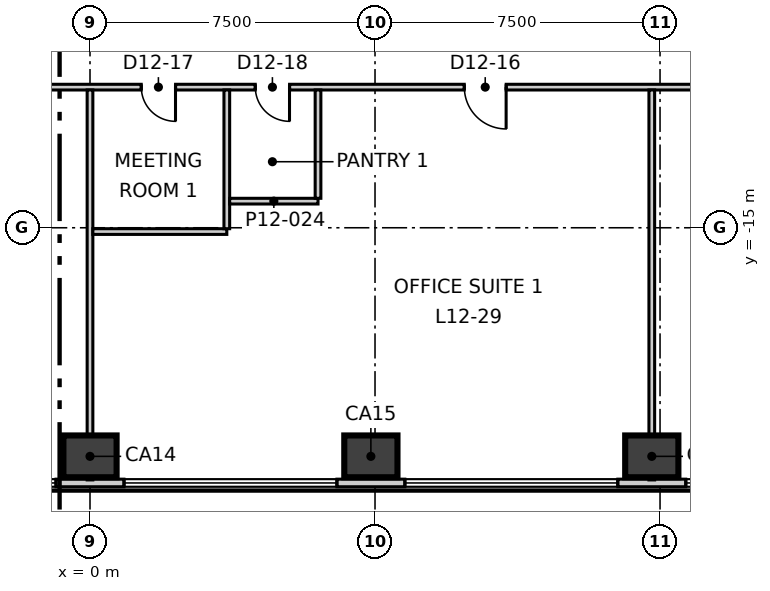
"""IFC4 building model, lengths in metres.
Left out: names, types, materials, properties, quantities, classifications, styles, units other than length and angle.
Written with IfcOpenShell. Run it as: python <this file> out.ifc"""

import sys

from ifc_helpers import new_model, si_unit, direction, frame, frame_2d, origin, origin_2d, place, context, subcontext, project, spatial, rectangle, extrude, element, fill, save


model = new_model("IFC4")
c1 = context("Model", 3, precision=1e-05, world=origin(), true_north=direction((0.0, 1.0)))
c2 = subcontext(c1, "Body", "Model", "MODEL_VIEW")
j1 = project(units=[si_unit("LENGTHUNIT", "METRE"), si_unit("PLANEANGLEUNIT", "RADIAN")], contexts=[c1])
p1 = place(None, origin())
s1 = spatial("IfcSite", under=j1, at=p1, CompositionType="ELEMENT")
p2 = place(p1, origin())
s2 = spatial("IfcBuilding", under=s1, at=p2, CompositionType="ELEMENT")
p3 = place(p2, frame((0.0, 0.0, 59.3)))
s3 = spatial("IfcBuildingStorey", under=s2, at=p3, CompositionType="ELEMENT", Elevation=59.3)
for number, where, z_axis, x_axis in (
    (1, (0.0, -21.015, -0.3), (0.0, 0.0, 1.0), (1.0, 0.0, 0.0)),
    (2, (7.391, -21.015, -0.3), (0.0, 0.0, 1.0), (1.0, 0.0, 0.0)),
    (3, (14.783, -21.015, -0.3), (0.0, 0.0, 1.0), (1.0, 0.0, 0.0)),
):
    element("IfcColumn", number, at=place(p3, frame(where, z_axis=z_axis, x_axis=x_axis)), inside=s3, PredefinedType="COLUMN", context=c2, shape_type="SweptSolid", body=[
        extrude(rectangle(XDim=1.4, YDim=1.1, at=origin_2d()), origin(), (0.0, 0.0, 1.0), 4.0),
    ])
p4 = place(p3, frame((-30.869, -21.715, 0.0), z_axis=(0.0, 0.0, 1.0), x_axis=(1.0, 0.0, 0.0)))
e4 = element("IfcWall", 4, at=p4, inside=s3, PredefinedType="ELEMENTEDWALL", context=c2, shape_type="SweptSolid", body=[
    extrude(rectangle(XDim=61.718, YDim=0.2, at=frame_2d((30.859, 0.0))), origin(), (0.0, 0.0, 1.0), 3.7),
])
p5 = place(p4, frame((2.199, 0.0, 0.9)))
e5 = element("IfcOpeningElement", 5, at=p5, cuts=e4, PredefinedType="OPENING", context=c2, shape_type="SweptSolid", body=[
    extrude(rectangle(XDim=5.6, YDim=2.5, at=frame_2d((2.8, 1.25))), frame((0.0, 0.11, 0.0), z_axis=(0.0, -1.0, 0.0), x_axis=(1.0, 0.0, 0.0)), (0.0, 0.0, 1.0), 0.22),
])
p6 = place(p4, frame((9.59, 0.0, 0.9)))
e6 = element("IfcOpeningElement", 6, at=p6, cuts=e4, PredefinedType="OPENING", context=c2, shape_type="SweptSolid", body=[
    extrude(rectangle(XDim=5.6, YDim=2.5, at=frame_2d((2.8, 1.25))), frame((0.0, 0.11, 0.0), z_axis=(0.0, -1.0, 0.0), x_axis=(1.0, 0.0, 0.0)), (0.0, 0.0, 1.0), 0.22),
])
p7 = place(p4, frame((16.982, 0.0, 0.9)))
e7 = element("IfcOpeningElement", 7, at=p7, cuts=e4, PredefinedType="OPENING", context=c2, shape_type="SweptSolid", body=[
    extrude(rectangle(XDim=5.6, YDim=2.5, at=frame_2d((2.8, 1.25))), frame((0.0, 0.11, 0.0), z_axis=(0.0, -1.0, 0.0), x_axis=(1.0, 0.0, 0.0)), (0.0, 0.0, 1.0), 0.22),
])
p8 = place(p4, frame((24.373, 0.0, 0.9)))
e8 = element("IfcOpeningElement", 8, at=p8, cuts=e4, PredefinedType="OPENING", context=c2, shape_type="SweptSolid", body=[
    extrude(rectangle(XDim=5.6, YDim=2.5, at=frame_2d((2.8, 1.25))), frame((0.0, 0.11, 0.0), z_axis=(0.0, -1.0, 0.0), x_axis=(1.0, 0.0, 0.0)), (0.0, 0.0, 1.0), 0.22),
])
p9 = place(p4, frame((31.765, 0.0, 0.9)))
e9 = element("IfcOpeningElement", 9, at=p9, cuts=e4, PredefinedType="OPENING", context=c2, shape_type="SweptSolid", body=[
    extrude(rectangle(XDim=5.6, YDim=2.5, at=frame_2d((2.8, 1.25))), frame((0.0, 0.11, 0.0), z_axis=(0.0, -1.0, 0.0), x_axis=(1.0, 0.0, 0.0)), (0.0, 0.0, 1.0), 0.22),
])
p10 = place(p4, frame((39.156, 0.0, 0.9)))
e10 = element("IfcOpeningElement", 10, at=p10, cuts=e4, PredefinedType="OPENING", context=c2, shape_type="SweptSolid", body=[
    extrude(rectangle(XDim=5.6, YDim=2.5, at=frame_2d((2.8, 1.25))), frame((0.0, 0.11, 0.0), z_axis=(0.0, -1.0, 0.0), x_axis=(1.0, 0.0, 0.0)), (0.0, 0.0, 1.0), 0.22),
])
p11 = place(p4, frame((46.548, 0.0, 0.9)))
e11 = element("IfcOpeningElement", 11, at=p11, cuts=e4, PredefinedType="OPENING", context=c2, shape_type="SweptSolid", body=[
    extrude(rectangle(XDim=5.6, YDim=2.5, at=frame_2d((2.8, 1.25))), frame((0.0, 0.11, 0.0), z_axis=(0.0, -1.0, 0.0), x_axis=(1.0, 0.0, 0.0)), (0.0, 0.0, 1.0), 0.22),
])
p12 = place(p4, frame((53.939, 0.0, 0.9)))
e12 = element("IfcOpeningElement", 12, at=p12, cuts=e4, PredefinedType="OPENING", context=c2, shape_type="SweptSolid", body=[
    extrude(rectangle(XDim=5.6, YDim=2.5, at=frame_2d((2.8, 1.25))), frame((0.0, 0.11, 0.0), z_axis=(0.0, -1.0, 0.0), x_axis=(1.0, 0.0, 0.0)), (0.0, 0.0, 1.0), 0.22),
])
p13 = place(p3, frame((34.241, -15.876, 0.0), z_axis=(0.0, 0.0, 1.0), x_axis=(-0.500006313899, 0.866021758423, 0.0)))
e13 = element("IfcWall", 13, at=p13, inside=s3, PredefinedType="ELEMENTEDWALL", context=c2, shape_type="SweptSolid", body=[
    extrude(rectangle(XDim=61.719, YDim=0.2, at=frame_2d((30.859, 0.0))), origin(), (0.0, 0.0, 1.0), 3.7),
])
p14 = place(p13, frame((2.199, 0.0, 0.9)))
e14 = element("IfcOpeningElement", 14, at=p14, cuts=e13, PredefinedType="OPENING", context=c2, shape_type="SweptSolid", body=[
    extrude(rectangle(XDim=5.6, YDim=2.5, at=frame_2d((2.8, 1.25))), frame((0.0, 0.11, 0.0), z_axis=(0.0, -1.0, 0.0), x_axis=(1.0, 0.0, 0.0)), (0.0, 0.0, 1.0), 0.22),
])
p15 = place(p13, frame((9.59, 0.0, 0.9)))
e15 = element("IfcOpeningElement", 15, at=p15, cuts=e13, PredefinedType="OPENING", context=c2, shape_type="SweptSolid", body=[
    extrude(rectangle(XDim=5.6, YDim=2.5, at=frame_2d((2.8, 1.25))), frame((0.0, 0.11, 0.0), z_axis=(0.0, -1.0, 0.0), x_axis=(1.0, 0.0, 0.0)), (0.0, 0.0, 1.0), 0.22),
])
p16 = place(p13, frame((16.982, 0.0, 0.9)))
e16 = element("IfcOpeningElement", 16, at=p16, cuts=e13, PredefinedType="OPENING", context=c2, shape_type="SweptSolid", body=[
    extrude(rectangle(XDim=5.6, YDim=2.5, at=frame_2d((2.8, 1.25))), frame((0.0, 0.11, 0.0), z_axis=(0.0, -1.0, 0.0), x_axis=(1.0, 0.0, 0.0)), (0.0, 0.0, 1.0), 0.22),
])
p17 = place(p13, frame((24.374, 0.0, 0.9)))
e17 = element("IfcOpeningElement", 17, at=p17, cuts=e13, PredefinedType="OPENING", context=c2, shape_type="SweptSolid", body=[
    extrude(rectangle(XDim=5.6, YDim=2.5, at=frame_2d((2.8, 1.25))), frame((0.0, 0.11, 0.0), z_axis=(0.0, -1.0, 0.0), x_axis=(1.0, 0.0, 0.0)), (0.0, 0.0, 1.0), 0.22),
])
p18 = place(p13, frame((31.765, 0.0, 0.9)))
e18 = element("IfcOpeningElement", 18, at=p18, cuts=e13, PredefinedType="OPENING", context=c2, shape_type="SweptSolid", body=[
    extrude(rectangle(XDim=5.6, YDim=2.5, at=frame_2d((2.8, 1.25))), frame((0.0, 0.11, 0.0), z_axis=(0.0, -1.0, 0.0), x_axis=(1.0, 0.0, 0.0)), (0.0, 0.0, 1.0), 0.22),
])
p19 = place(p13, frame((39.157, 0.0, 0.9)))
e19 = element("IfcOpeningElement", 19, at=p19, cuts=e13, PredefinedType="OPENING", context=c2, shape_type="SweptSolid", body=[
    extrude(rectangle(XDim=5.6, YDim=2.5, at=frame_2d((2.8, 1.25))), frame((0.0, 0.11, 0.0), z_axis=(0.0, -1.0, 0.0), x_axis=(1.0, 0.0, 0.0)), (0.0, 0.0, 1.0), 0.22),
])
p20 = place(p13, frame((46.549, 0.0, 0.9)))
e20 = element("IfcOpeningElement", 20, at=p20, cuts=e13, PredefinedType="OPENING", context=c2, shape_type="SweptSolid", body=[
    extrude(rectangle(XDim=5.6, YDim=2.5, at=frame_2d((2.8, 1.25))), frame((0.0, 0.11, 0.0), z_axis=(0.0, -1.0, 0.0), x_axis=(1.0, 0.0, 0.0)), (0.0, 0.0, 1.0), 0.22),
])
p21 = place(p13, frame((53.94, 0.0, 0.9)))
e21 = element("IfcOpeningElement", 21, at=p21, cuts=e13, PredefinedType="OPENING", context=c2, shape_type="SweptSolid", body=[
    extrude(rectangle(XDim=5.6, YDim=2.5, at=frame_2d((2.8, 1.25))), frame((0.0, 0.11, 0.0), z_axis=(0.0, -1.0, 0.0), x_axis=(1.0, 0.0, 0.0)), (0.0, 0.0, 1.0), 0.22),
])
p22 = place(p3, frame((-19.497, -11.17, 0.0), z_axis=(0.0, 0.0, 1.0), x_axis=(0.499998854553, 0.866026065108, 0.0)))
e22 = element("IfcWall", 22, at=p22, inside=s3, PredefinedType="PARTITIONING", context=c2, shape_type="SweptSolid", body=[
    extrude(rectangle(XDim=38.994, YDim=0.15, at=frame_2d((19.497, 0.0))), origin(), (0.0, 0.0, 1.0), 3.7),
])
p23 = place(p22, frame((36.044, 0.0, 0.0)))
e23 = element("IfcOpeningElement", 23, at=p23, cuts=e22, PredefinedType="OPENING", context=c2, shape_type="SweptSolid", body=[
    extrude(rectangle(XDim=1.1, YDim=2.1, at=frame_2d((0.55, 1.05))), frame((0.0, 0.085, 0.0), z_axis=(0.0, -1.0, 0.0), x_axis=(1.0, 0.0, 0.0)), (0.0, 0.0, 1.0), 0.17),
])
p24 = place(p22, frame((21.855, 0.0, 0.0)))
e24 = element("IfcOpeningElement", 24, at=p24, cuts=e22, PredefinedType="OPENING", context=c2, shape_type="SweptSolid", body=[
    extrude(rectangle(XDim=1.1, YDim=2.1, at=frame_2d((0.55, 1.05))), frame((0.0, 0.085, 0.0), z_axis=(0.0, -1.0, 0.0), x_axis=(1.0, 0.0, 0.0)), (0.0, 0.0, 1.0), 0.17),
])
p25 = place(p22, frame((32.155, 0.0, 0.0)))
e25 = element("IfcOpeningElement", 25, at=p25, cuts=e22, PredefinedType="OPENING", context=c2, shape_type="SweptSolid", body=[
    extrude(rectangle(XDim=0.9, YDim=2.1, at=frame_2d((0.45, 1.05))), frame((0.0, 0.085, 0.0), z_axis=(0.0, -1.0, 0.0), x_axis=(1.0, 0.0, 0.0)), (0.0, 0.0, 1.0), 0.17),
])
p26 = place(p22, frame((28.955, 0.0, 0.0)))
e26 = element("IfcOpeningElement", 26, at=p26, cuts=e22, PredefinedType="OPENING", context=c2, shape_type="SweptSolid", body=[
    extrude(rectangle(XDim=0.9, YDim=2.1, at=frame_2d((0.45, 1.05))), frame((0.0, 0.085, 0.0), z_axis=(0.0, -1.0, 0.0), x_axis=(1.0, 0.0, 0.0)), (0.0, 0.0, 1.0), 0.17),
])
p27 = place(p22, frame((26.055, 0.0, 0.0)))
e27 = element("IfcOpeningElement", 27, at=p27, cuts=e22, PredefinedType="OPENING", context=c2, shape_type="SweptSolid", body=[
    extrude(rectangle(XDim=1.0, YDim=2.1, at=frame_2d((0.5, 1.05))), frame((0.0, 0.085, 0.0), z_axis=(0.0, -1.0, 0.0), x_axis=(1.0, 0.0, 0.0)), (0.0, 0.0, 1.0), 0.17),
])
p28 = place(p22, frame((10.373, 0.0, 0.0)))
e28 = element("IfcOpeningElement", 28, at=p28, cuts=e22, PredefinedType="OPENING", context=c2, shape_type="SweptSolid", body=[
    extrude(rectangle(XDim=1.0, YDim=2.1, at=frame_2d((0.5, 1.05))), frame((0.0, 0.085, 0.0), z_axis=(0.0, -1.0, 0.0), x_axis=(1.0, 0.0, 0.0)), (0.0, 0.0, 1.0), 0.17),
])
p29 = place(p22, frame((17.773, 0.0, 0.0)))
e29 = element("IfcOpeningElement", 29, at=p29, cuts=e22, PredefinedType="OPENING", context=c2, shape_type="SweptSolid", body=[
    extrude(rectangle(XDim=0.9, YDim=2.1, at=frame_2d((0.45, 1.05))), frame((0.0, 0.085, 0.0), z_axis=(0.0, -1.0, 0.0), x_axis=(1.0, 0.0, 0.0)), (0.0, 0.0, 1.0), 0.17),
])
p30 = place(p22, frame((1.689, 0.0, 0.0)))
e30 = element("IfcOpeningElement", 30, at=p30, cuts=e22, PredefinedType="OPENING", context=c2, shape_type="SweptSolid", body=[
    extrude(rectangle(XDim=1.1, YDim=2.1, at=frame_2d((0.55, 1.05))), frame((0.0, 0.085, 0.0), z_axis=(0.0, -1.0, 0.0), x_axis=(1.0, 0.0, 0.0)), (0.0, 0.0, 1.0), 0.17),
])
p31 = place(p3, frame((-19.422, -11.3, 0.0), z_axis=(0.0, 0.0, 1.0), x_axis=(1.0, 0.0, 0.0)))
e31 = element("IfcWall", 31, at=p31, inside=s3, PredefinedType="PARTITIONING", context=c2, shape_type="SweptSolid", body=[
    extrude(rectangle(XDim=38.994, YDim=0.15, at=frame_2d((19.497, 0.0))), origin(), (0.0, 0.0, 1.0), 3.7),
])
p32 = place(p31, frame((1.7, 0.0, 0.0)))
e32 = element("IfcOpeningElement", 32, at=p32, cuts=e31, PredefinedType="OPENING", context=c2, shape_type="SweptSolid", body=[
    extrude(rectangle(XDim=1.1, YDim=2.1, at=frame_2d((0.55, 1.05))), frame((0.0, 0.085, 0.0), z_axis=(0.0, -1.0, 0.0), x_axis=(1.0, 0.0, 0.0)), (0.0, 0.0, 1.0), 0.17),
])
p33 = place(p31, frame((12.889, 0.0, 0.0)))
e33 = element("IfcOpeningElement", 33, at=p33, cuts=e31, PredefinedType="OPENING", context=c2, shape_type="SweptSolid", body=[
    extrude(rectangle(XDim=1.0, YDim=2.1, at=frame_2d((0.5, 1.05))), frame((0.0, 0.085, 0.0), z_axis=(0.0, -1.0, 0.0), x_axis=(1.0, 0.0, 0.0)), (0.0, 0.0, 1.0), 0.17),
])
p34 = place(p31, frame((5.589, 0.0, 0.0)))
e34 = element("IfcOpeningElement", 34, at=p34, cuts=e31, PredefinedType="OPENING", context=c2, shape_type="SweptSolid", body=[
    extrude(rectangle(XDim=0.9, YDim=2.1, at=frame_2d((0.45, 1.05))), frame((0.0, 0.085, 0.0), z_axis=(0.0, -1.0, 0.0), x_axis=(1.0, 0.0, 0.0)), (0.0, 0.0, 1.0), 0.17),
])
p35 = place(p31, frame((29.272, 0.0, 0.0)))
e35 = element("IfcOpeningElement", 35, at=p35, cuts=e31, PredefinedType="OPENING", context=c2, shape_type="SweptSolid", body=[
    extrude(rectangle(XDim=1.1, YDim=2.1, at=frame_2d((0.55, 1.05))), frame((0.0, 0.085, 0.0), z_axis=(0.0, -1.0, 0.0), x_axis=(1.0, 0.0, 0.0)), (0.0, 0.0, 1.0), 0.17),
])
p36 = place(p31, frame((20.772, 0.0, 0.0)))
e36 = element("IfcOpeningElement", 36, at=p36, cuts=e31, PredefinedType="OPENING", context=c2, shape_type="SweptSolid", body=[
    extrude(rectangle(XDim=0.9, YDim=2.1, at=frame_2d((0.45, 1.05))), frame((0.0, 0.085, 0.0), z_axis=(0.0, -1.0, 0.0), x_axis=(1.0, 0.0, 0.0)), (0.0, 0.0, 1.0), 0.17),
])
p37 = place(p31, frame((23.772, 0.0, 0.0)))
e37 = element("IfcOpeningElement", 37, at=p37, cuts=e31, PredefinedType="OPENING", context=c2, shape_type="SweptSolid", body=[
    extrude(rectangle(XDim=0.9, YDim=2.1, at=frame_2d((0.45, 1.05))), frame((0.0, 0.085, 0.0), z_axis=(0.0, -1.0, 0.0), x_axis=(1.0, 0.0, 0.0)), (0.0, 0.0, 1.0), 0.17),
])
p38 = place(p31, frame((36.055, 0.0, 0.0)))
e38 = element("IfcOpeningElement", 38, at=p38, cuts=e31, PredefinedType="OPENING", context=c2, shape_type="SweptSolid", body=[
    extrude(rectangle(XDim=1.1, YDim=2.1, at=frame_2d((0.55, 1.05))), frame((0.0, 0.085, 0.0), z_axis=(0.0, -1.0, 0.0), x_axis=(1.0, 0.0, 0.0)), (0.0, 0.0, 1.0), 0.17),
])
p39 = place(p3, frame((0.0, -21.635, 0.0), z_axis=(0.0, 0.0, 1.0), x_axis=(0.0, 1.0, 0.0)))
e39 = element("IfcWall", 39, at=p39, inside=s3, PredefinedType="PARTITIONING", context=c2, shape_type="SweptSolid", body=[
    extrude(rectangle(XDim=10.26, YDim=0.15, at=frame_2d((5.13, 0.0))), origin(), (0.0, 0.0, 1.0), 3.2),
])
p40 = place(p3, frame((0.075, -15.1, 0.0), z_axis=(0.0, 0.0, 1.0), x_axis=(1.0, 0.0, 0.0)))
e40 = element("IfcWall", 40, at=p40, inside=s3, PredefinedType="PARTITIONING", context=c2, shape_type="SweptSolid", body=[
    extrude(rectangle(XDim=3.525, YDim=0.15, at=frame_2d((1.763, 0.0))), origin(), (0.0, 0.0, 1.0), 3.7),
])
p41 = place(p3, frame((3.6, -15.025, 0.0), z_axis=(0.0, 0.0, 1.0), x_axis=(0.0, 1.0, 0.0)))
e41 = element("IfcWall", 41, at=p41, inside=s3, PredefinedType="PARTITIONING", context=c2, shape_type="SweptSolid", body=[
    extrude(rectangle(XDim=3.65, YDim=0.15, at=frame_2d((1.825, 0.0))), origin(), (0.0, 0.0, 1.0), 3.7),
])
p42 = place(p3, frame((0.075, 22.47, 0.0), z_axis=(0.0, 0.0, 1.0), x_axis=(0.500002280369, -0.866024087209, 0.0)))
e42 = element("IfcWall", 42, at=p42, inside=s3, PredefinedType="PARTITIONING", context=c2, shape_type="SweptSolid", body=[
    extrude(rectangle(XDim=38.844, YDim=0.15, at=frame_2d((19.422, 0.0))), origin(), (0.0, 0.0, 1.0), 3.7),
])
p43 = place(p42, frame((36.044, 0.0, 0.0)))
e43 = element("IfcOpeningElement", 43, at=p43, cuts=e42, PredefinedType="OPENING", context=c2, shape_type="SweptSolid", body=[
    extrude(rectangle(XDim=1.1, YDim=2.1, at=frame_2d((0.55, 1.05))), frame((0.0, 0.085, 0.0), z_axis=(0.0, -1.0, 0.0), x_axis=(1.0, 0.0, 0.0)), (0.0, 0.0, 1.0), 0.17),
])
p44 = place(p42, frame((26.255, 0.0, 0.0)))
e44 = element("IfcOpeningElement", 44, at=p44, cuts=e42, PredefinedType="OPENING", context=c2, shape_type="SweptSolid", body=[
    extrude(rectangle(XDim=1.1, YDim=2.1, at=frame_2d((0.55, 1.05))), frame((0.0, 0.085, 0.0), z_axis=(0.0, -1.0, 0.0), x_axis=(1.0, 0.0, 0.0)), (0.0, 0.0, 1.0), 0.17),
])
p45 = place(p42, frame((9.173, 0.0, 0.0)))
e45 = element("IfcOpeningElement", 45, at=p45, cuts=e42, PredefinedType="OPENING", context=c2, shape_type="SweptSolid", body=[
    extrude(rectangle(XDim=1.1, YDim=2.1, at=frame_2d((0.55, 1.05))), frame((0.0, 0.085, 0.0), z_axis=(0.0, -1.0, 0.0), x_axis=(1.0, 0.0, 0.0)), (0.0, 0.0, 1.0), 0.17),
])
p46 = place(p42, frame((17.373, 0.0, 0.0)))
e46 = element("IfcOpeningElement", 46, at=p46, cuts=e42, PredefinedType="OPENING", context=c2, shape_type="SweptSolid", body=[
    extrude(rectangle(XDim=0.9, YDim=2.1, at=frame_2d((0.45, 1.05))), frame((0.0, 0.085, 0.0), z_axis=(0.0, -1.0, 0.0), x_axis=(1.0, 0.0, 0.0)), (0.0, 0.0, 1.0), 0.17),
])
p47 = place(p42, frame((14.173, 0.0, 0.0)))
e47 = element("IfcOpeningElement", 47, at=p47, cuts=e42, PredefinedType="OPENING", context=c2, shape_type="SweptSolid", body=[
    extrude(rectangle(XDim=0.9, YDim=2.1, at=frame_2d((0.45, 1.05))), frame((0.0, 0.085, 0.0), z_axis=(0.0, -1.0, 0.0), x_axis=(1.0, 0.0, 0.0)), (0.0, 0.0, 1.0), 0.17),
])
p48 = place(p42, frame((11.273, 0.0, 0.0)))
e48 = element("IfcOpeningElement", 48, at=p48, cuts=e42, PredefinedType="OPENING", context=c2, shape_type="SweptSolid", body=[
    extrude(rectangle(XDim=1.0, YDim=2.1, at=frame_2d((0.5, 1.05))), frame((0.0, 0.085, 0.0), z_axis=(0.0, -1.0, 0.0), x_axis=(1.0, 0.0, 0.0)), (0.0, 0.0, 1.0), 0.17),
])
p49 = place(p42, frame((1.689, 0.0, 0.0)))
e49 = element("IfcOpeningElement", 49, at=p49, cuts=e42, PredefinedType="OPENING", context=c2, shape_type="SweptSolid", body=[
    extrude(rectangle(XDim=1.1, YDim=2.1, at=frame_2d((0.55, 1.05))), frame((0.0, 0.085, 0.0), z_axis=(0.0, -1.0, 0.0), x_axis=(1.0, 0.0, 0.0)), (0.0, 0.0, 1.0), 0.17),
])
p50 = place(p3, frame((3.675, -14.3, 0.0), z_axis=(0.0, 0.0, 1.0), x_axis=(1.0, 0.0, 0.0)))
e50 = element("IfcWall", 50, at=p50, inside=s3, PredefinedType="PARTITIONING", context=c2, shape_type="SweptSolid", body=[
    extrude(rectangle(XDim=2.325, YDim=0.15, at=frame_2d((1.163, 0.0))), origin(), (0.0, 0.0, 1.0), 3.7),
])
p51 = place(p3, frame((6.0, -14.225, 0.0), z_axis=(0.0, 0.0, 1.0), x_axis=(0.0, 1.0, 0.0)))
e51 = element("IfcWall", 51, at=p51, inside=s3, PredefinedType="PARTITIONING", context=c2, shape_type="SweptSolid", body=[
    extrude(rectangle(XDim=2.85, YDim=0.15, at=frame_2d((1.425, 0.0))), origin(), (0.0, 0.0, 1.0), 3.7),
])
p52 = place(p3, frame((14.783, -21.635, 0.0), z_axis=(0.0, 0.0, 1.0), x_axis=(0.0, 1.0, 0.0)))
e52 = element("IfcWall", 52, at=p52, inside=s3, PredefinedType="PARTITIONING", context=c2, shape_type="SweptSolid", body=[
    extrude(rectangle(XDim=10.26, YDim=0.15, at=frame_2d((5.13, 0.0))), origin(), (0.0, 0.0, 1.0), 3.7),
])
p53 = place(p8, origin())
e53 = element("IfcWindow", 53, at=p53, inside=s3, PartitioningType="SINGLE_PANEL", PredefinedType="WINDOW", context=c2, shape_type="SweptSolid", body=[
    extrude(rectangle(XDim=5.6, YDim=2.5, at=frame_2d((2.8, 1.25))), frame((0.0, 0.03, 0.0), z_axis=(0.0, -1.0, 0.0), x_axis=(1.0, 0.0, 0.0)), (0.0, 0.0, 1.0), 0.06),
])
fill(e8, e53)
p54 = place(p9, origin())
e54 = element("IfcWindow", 54, at=p54, inside=s3, PartitioningType="SINGLE_PANEL", PredefinedType="WINDOW", context=c2, shape_type="SweptSolid", body=[
    extrude(rectangle(XDim=5.6, YDim=2.5, at=frame_2d((2.8, 1.25))), frame((0.0, 0.03, 0.0), z_axis=(0.0, -1.0, 0.0), x_axis=(1.0, 0.0, 0.0)), (0.0, 0.0, 1.0), 0.06),
])
fill(e9, e54)
p55 = place(p10, origin())
e55 = element("IfcWindow", 55, at=p55, inside=s3, PartitioningType="SINGLE_PANEL", PredefinedType="WINDOW", context=c2, shape_type="SweptSolid", body=[
    extrude(rectangle(XDim=5.6, YDim=2.5, at=frame_2d((2.8, 1.25))), frame((0.0, 0.03, 0.0), z_axis=(0.0, -1.0, 0.0), x_axis=(1.0, 0.0, 0.0)), (0.0, 0.0, 1.0), 0.06),
])
fill(e10, e55)
p56 = place(p11, origin())
e56 = element("IfcWindow", 56, at=p56, inside=s3, PartitioningType="SINGLE_PANEL", PredefinedType="WINDOW", context=c2, shape_type="SweptSolid", body=[
    extrude(rectangle(XDim=5.6, YDim=2.5, at=frame_2d((2.8, 1.25))), frame((0.0, 0.03, 0.0), z_axis=(0.0, -1.0, 0.0), x_axis=(1.0, 0.0, 0.0)), (0.0, 0.0, 1.0), 0.06),
])
fill(e11, e56)
p57 = place(p35, origin())
e57 = element("IfcDoor", 57, at=p57, inside=s3, OperationType="SINGLE_SWING_RIGHT", PredefinedType="DOOR", context=c2, shape_type="SweptSolid", body=[
    extrude(rectangle(XDim=1.1, YDim=2.1, at=frame_2d((0.55, 1.05))), frame((0.0, 0.025, 0.0), z_axis=(0.0, -1.0, 0.0), x_axis=(1.0, 0.0, 0.0)), (0.0, 0.0, 1.0), 0.05),
])
fill(e35, e57)
p58 = place(p36, origin())
e58 = element("IfcDoor", 58, at=p58, inside=s3, OperationType="SINGLE_SWING_RIGHT", PredefinedType="DOOR", context=c2, shape_type="SweptSolid", body=[
    extrude(rectangle(XDim=0.9, YDim=2.1, at=frame_2d((0.45, 1.05))), frame((0.0, 0.025, 0.0), z_axis=(0.0, -1.0, 0.0), x_axis=(1.0, 0.0, 0.0)), (0.0, 0.0, 1.0), 0.05),
])
fill(e36, e58)
p59 = place(p37, origin())
e59 = element("IfcDoor", 59, at=p59, inside=s3, OperationType="SINGLE_SWING_RIGHT", PredefinedType="DOOR", context=c2, shape_type="SweptSolid", body=[
    extrude(rectangle(XDim=0.9, YDim=2.1, at=frame_2d((0.45, 1.05))), frame((0.0, 0.025, 0.0), z_axis=(0.0, -1.0, 0.0), x_axis=(1.0, 0.0, 0.0)), (0.0, 0.0, 1.0), 0.05),
])
fill(e37, e59)
save(model, sys.argv[1])
